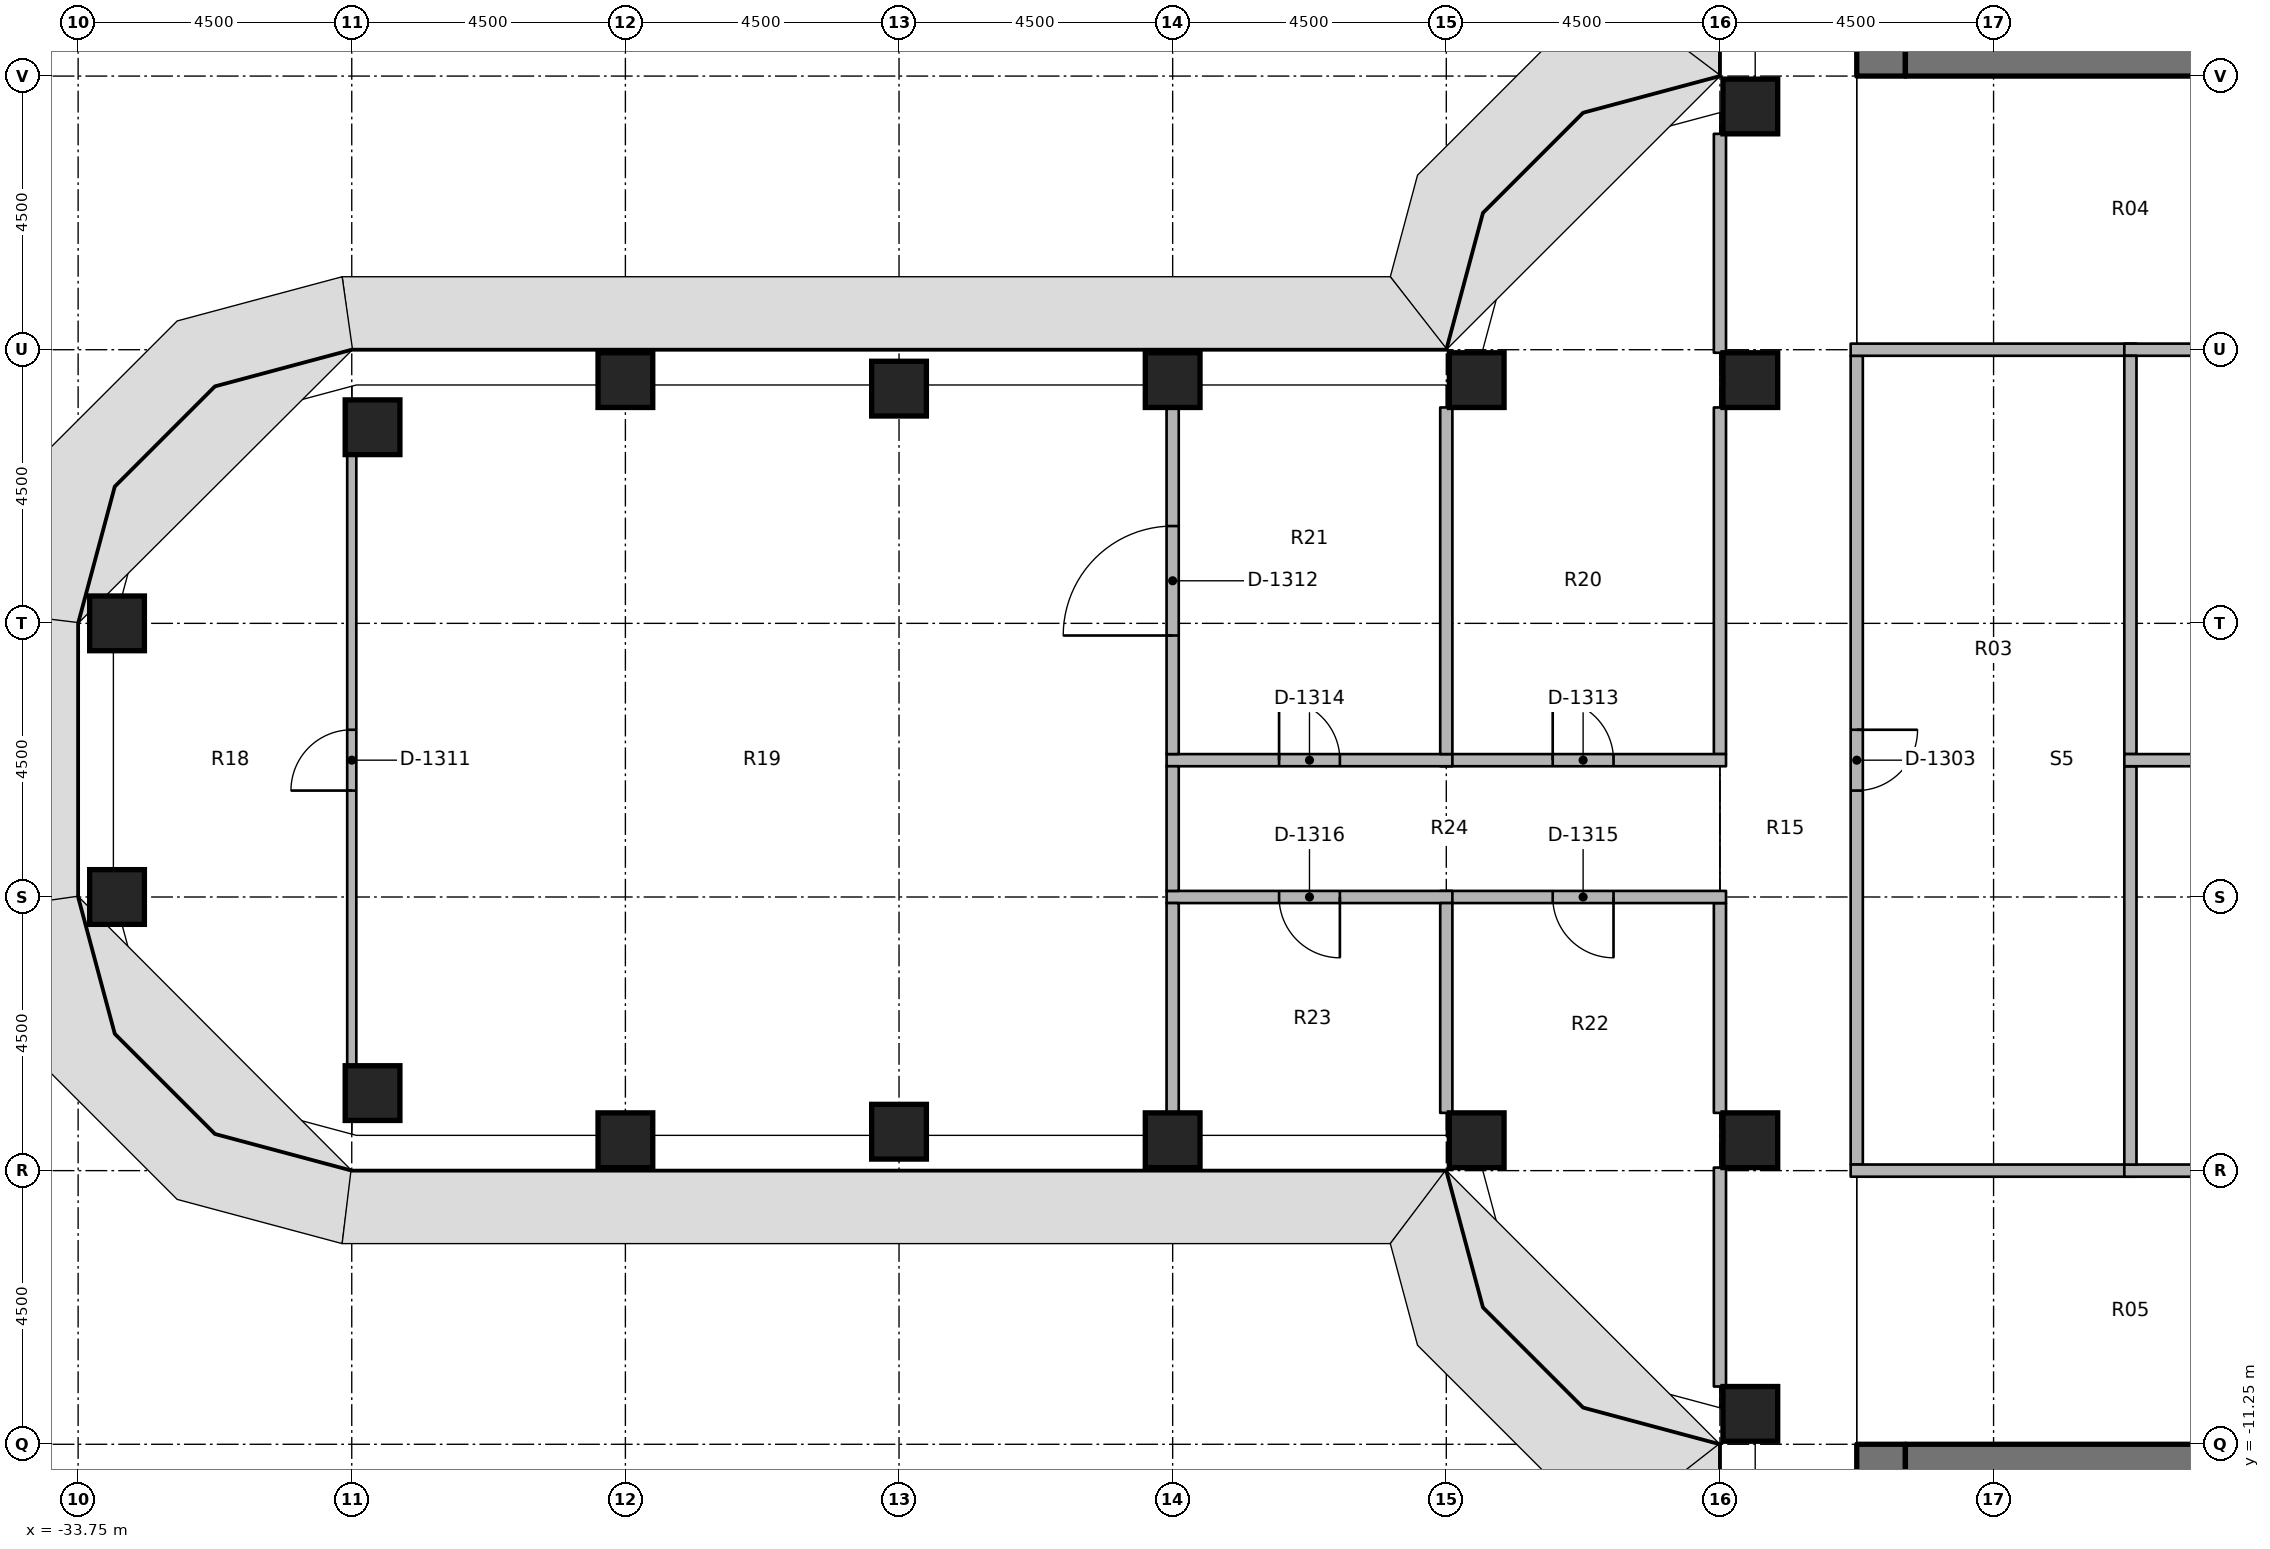
"""IFC4 building model, lengths in metres.
Left out: names, types, materials, properties, quantities, classifications, styles, units other than length and angle.
Written with IfcOpenShell. Run it as: python <this file> out.ifc"""

import sys

from ifc_helpers import new_model, si_unit, direction, frame, frame_2d, origin, origin_2d, place, context, subcontext, project, spatial, rectangle, extrude, element, fill, save


model = new_model("IFC4")
c1 = context("Model", 3, precision=1e-05, world=origin(), true_north=direction((0.0, 1.0)))
c2 = subcontext(c1, "Body", "Model", "MODEL_VIEW")
j1 = project(units=[si_unit("LENGTHUNIT", "METRE"), si_unit("PLANEANGLEUNIT", "RADIAN")], contexts=[c1])
p1 = place(None, origin())
s1 = spatial("IfcSite", under=j1, at=p1, CompositionType="ELEMENT")
p2 = place(p1, origin())
s2 = spatial("IfcBuilding", under=s1, at=p2, CompositionType="ELEMENT")
p3 = place(p2, frame((0.0, 0.0, 132.2)))
s3 = spatial("IfcBuildingStorey", under=s2, at=p3, CompositionType="ELEMENT", Elevation=132.2)
for number, where, z_axis, x_axis in (
    (1, (-33.11, -2.25, 0.0), (0.0, 0.0, 1.0), (1.0, 0.0, 0.0)),
    (2, (-33.11, 2.25, 0.0), (0.0, 0.0, 1.0), (1.0, 0.0, 0.0)),
    (3, (-28.908, -5.475, 0.0), (0.0, 0.0, 1.0), (1.0, 0.0, 0.0)),
    (4, (-28.908, 5.475, 0.0), (0.0, 0.0, 1.0), (1.0, 0.0, 0.0)),
    (5, (-24.75, -6.25, 0.0), (0.0, 0.0, 1.0), (1.0, 0.0, 0.0)),
    (6, (-24.75, 6.25, 0.0), (0.0, 0.0, 1.0), (1.0, 0.0, 0.0)),
    (7, (-20.25, -6.11, 0.0), (0.0, 0.0, 1.0), (1.0, 0.0, 0.0)),
    (8, (-20.25, 6.11, 0.0), (0.0, 0.0, 1.0), (1.0, 0.0, 0.0)),
    (9, (-15.75, -6.25, 0.0), (0.0, 0.0, 1.0), (1.0, 0.0, 0.0)),
    (10, (-15.75, 6.25, 0.0), (0.0, 0.0, 1.0), (1.0, 0.0, 0.0)),
    (11, (-10.75, -6.25, 0.0), (0.0, 0.0, 1.0), (1.0, 0.0, 0.0)),
    (12, (-10.75, 6.25, 0.0), (0.0, 0.0, 1.0), (1.0, 0.0, 0.0)),
    (13, (-6.25, -10.75, 0.0), (0.0, 0.0, 1.0), (1.0, 0.0, 0.0)),
    (14, (-6.25, -6.25, 0.0), (0.0, 0.0, 1.0), (1.0, 0.0, 0.0)),
    (15, (-6.25, 6.25, 0.0), (0.0, 0.0, 1.0), (1.0, 0.0, 0.0)),
    (16, (-6.25, 10.75, 0.0), (0.0, 0.0, 1.0), (1.0, 0.0, 0.0)),
):
    element("IfcColumn", number, at=place(p3, frame(where, z_axis=z_axis, x_axis=x_axis)), inside=s3, PredefinedType="COLUMN", context=c2, shape_type="SweptSolid", body=[
        extrude(rectangle(XDim=0.9, YDim=0.9, at=origin_2d()), origin(), (0.0, 0.0, 1.0), 3.65),
    ])
p4 = place(p3, frame((-4.1, 11.25, 0.0), z_axis=(0.0, 0.0, 1.0), x_axis=(0.0, 1.0, 0.0)))
e17 = element("IfcWall", 17, at=p4, inside=s3, PredefinedType="SHEAR", context=c2, shape_type="SweptSolid", body=[
    extrude(rectangle(XDim=15.0, YDim=0.8, at=frame_2d((7.5, 0.0))), origin(), (0.0, 0.0, 1.0), 3.8),
])
p5 = place(p4, frame((7.15, 0.0, 0.0)))
e18 = element("IfcOpeningElement", 18, at=p5, cuts=e17, PredefinedType="OPENING", context=c2, shape_type="SweptSolid", body=[
    extrude(rectangle(XDim=1.5, YDim=2.3, at=frame_2d((0.75, 1.15))), frame((0.0, 0.41, 0.0), z_axis=(0.0, -1.0, 0.0), x_axis=(1.0, 0.0, 0.0)), (0.0, 0.0, 1.0), 0.82),
])
p6 = place(p4, frame((13.9, 0.0, 0.0)))
e19 = element("IfcOpeningElement", 19, at=p6, cuts=e17, PredefinedType="OPENING", context=c2, shape_type="SweptSolid", body=[
    extrude(rectangle(XDim=0.9, YDim=2.1, at=frame_2d((0.45, 1.05))), frame((0.0, 0.41, 0.0), z_axis=(0.0, -1.0, 0.0), x_axis=(1.0, 0.0, 0.0)), (0.0, 0.0, 1.0), 0.82),
])
p7 = place(p4, frame((1.15, 0.0, 0.0)))
e20 = element("IfcOpeningElement", 20, at=p7, cuts=e17, PredefinedType="OPENING", context=c2, shape_type="SweptSolid", body=[
    extrude(rectangle(XDim=1.2, YDim=2.1, at=frame_2d((0.6, 1.05))), frame((0.0, 0.41, 0.0), z_axis=(0.0, -1.0, 0.0), x_axis=(1.0, 0.0, 0.0)), (0.0, 0.0, 1.0), 0.82),
])
p8 = place(p3, frame((-3.7, 11.65, 0.0), z_axis=(0.0, 0.0, 1.0), x_axis=(1.0, 0.0, 0.0)))
e21 = element("IfcWall", 21, at=p8, inside=s3, PredefinedType="SHEAR", context=c2, shape_type="SweptSolid", body=[
    extrude(rectangle(XDim=7.4, YDim=0.8, at=frame_2d((3.7, 0.0))), origin(), (0.0, 0.0, 1.0), 3.8),
])
p9 = place(p3, frame((-4.1, -11.25, 0.0), z_axis=(0.0, 0.0, 1.0), x_axis=(0.0, -1.0, 0.0)))
e22 = element("IfcWall", 22, at=p9, inside=s3, PredefinedType="SHEAR", context=c2, shape_type="SweptSolid", body=[
    extrude(rectangle(XDim=15.0, YDim=0.8, at=frame_2d((7.5, 0.0))), origin(), (0.0, 0.0, 1.0), 3.8),
])
p10 = place(p9, frame((7.15, 0.0, 0.0)))
e23 = element("IfcOpeningElement", 23, at=p10, cuts=e22, PredefinedType="OPENING", context=c2, shape_type="SweptSolid", body=[
    extrude(rectangle(XDim=1.5, YDim=2.3, at=frame_2d((0.75, 1.15))), frame((0.0, 0.41, 0.0), z_axis=(0.0, -1.0, 0.0), x_axis=(1.0, 0.0, 0.0)), (0.0, 0.0, 1.0), 0.82),
])
p11 = place(p9, frame((5.55, 0.0, 0.0)))
e24 = element("IfcOpeningElement", 24, at=p11, cuts=e22, PredefinedType="OPENING", context=c2, shape_type="SweptSolid", body=[
    extrude(rectangle(XDim=1.2, YDim=2.1, at=frame_2d((0.6, 1.05))), frame((0.0, 0.41, 0.0), z_axis=(0.0, -1.0, 0.0), x_axis=(1.0, 0.0, 0.0)), (0.0, 0.0, 1.0), 0.82),
])
p12 = place(p3, frame((-3.7, -11.65, 0.0), z_axis=(0.0, 0.0, 1.0), x_axis=(1.0, 0.0, 0.0)))
e25 = element("IfcWall", 25, at=p12, inside=s3, PredefinedType="SHEAR", context=c2, shape_type="SweptSolid", body=[
    extrude(rectangle(XDim=7.4, YDim=0.8, at=frame_2d((3.7, 0.0))), origin(), (0.0, 0.0, 1.0), 3.8),
])
p13 = place(p3, frame((-4.5, 6.65, 0.0), z_axis=(0.0, 0.0, 1.0), x_axis=(0.0, -1.0, 0.0)))
e26 = element("IfcWall", 26, at=p13, inside=s3, PredefinedType="PARTITIONING", context=c2, shape_type="SweptSolid", body=[
    extrude(rectangle(XDim=13.3, YDim=0.2, at=frame_2d((6.65, 0.0))), origin(), (0.0, 0.0, 1.0), 2.738),
])
p14 = place(p13, frame((6.15, 0.0, 0.0)))
e27 = element("IfcOpeningElement", 27, at=p14, cuts=e26, PredefinedType="OPENING", context=c2, shape_type="SweptSolid", body=[
    extrude(rectangle(XDim=1.0, YDim=2.1, at=frame_2d((0.5, 1.05))), frame((0.0, 0.11, 0.0), z_axis=(0.0, -1.0, 0.0), x_axis=(1.0, 0.0, 0.0)), (0.0, 0.0, 1.0), 0.22),
])
p15 = place(p3, frame((-6.75, 0.1, 0.0), z_axis=(0.0, 0.0, 1.0), x_axis=(0.0, 1.0, 0.0)))
e28 = element("IfcWall", 28, at=p15, inside=s3, PredefinedType="PARTITIONING", context=c2, shape_type="SweptSolid", body=[
    extrude(rectangle(XDim=5.7, YDim=0.2, at=frame_2d((2.85, 0.0))), origin(), (0.0, 0.0, 1.0), 2.738),
])
for number, where, z_axis, x_axis in (
    (29, (-6.75, 6.7, 0.0), (0.0, 0.0, 1.0), (0.0, 1.0, 0.0)),
    (30, (-6.75, -10.3, 0.0), (0.0, 0.0, 1.0), (0.0, 1.0, 0.0)),
):
    element("IfcWall", number, at=place(p3, frame(where, z_axis=z_axis, x_axis=x_axis)), inside=s3, PredefinedType="PARTITIONING", context=c2, shape_type="SweptSolid", body=[
        extrude(rectangle(XDim=3.6, YDim=0.2, at=frame_2d((1.8, 0.0))), origin(), (0.0, 0.0, 1.0), 2.738),
    ])
p16 = place(p3, frame((-6.75, -5.8, 0.0), z_axis=(0.0, 0.0, 1.0), x_axis=(0.0, 1.0, 0.0)))
e31 = element("IfcWall", 31, at=p16, inside=s3, PredefinedType="PARTITIONING", context=c2, shape_type="SweptSolid", body=[
    extrude(rectangle(XDim=3.45, YDim=0.2, at=frame_2d((1.725, 0.0))), origin(), (0.0, 0.0, 1.0), 2.738),
])
for number, where, z_axis, x_axis in (
    (32, (-4.6, 6.75, 0.0), (0.0, 0.0, 1.0), (1.0, 0.0, 0.0)),
    (33, (-0.1, 6.75, 0.0), (0.0, 0.0, 1.0), (1.0, 0.0, 0.0)),
    (34, (-4.6, -6.75, 0.0), (0.0, 0.0, 1.0), (1.0, 0.0, 0.0)),
    (35, (-0.1, -6.75, 0.0), (0.0, 0.0, 1.0), (1.0, 0.0, 0.0)),
):
    element("IfcWall", number, at=place(p3, frame(where, z_axis=z_axis, x_axis=x_axis)), inside=s3, PredefinedType="PARTITIONING", context=c2, shape_type="SweptSolid", body=[
        extrude(rectangle(XDim=4.7, YDim=0.2, at=frame_2d((2.35, 0.0))), origin(), (0.0, 0.0, 1.0), 2.738),
    ])
for number, where, z_axis, x_axis in (
    (36, (0.0, 0.1, 0.0), (0.0, 0.0, 1.0), (0.0, 1.0, 0.0)),
    (37, (0.0, -6.65, 0.0), (0.0, 0.0, 1.0), (0.0, 1.0, 0.0)),
):
    element("IfcWall", number, at=place(p3, frame(where, z_axis=z_axis, x_axis=x_axis)), inside=s3, PredefinedType="PARTITIONING", context=c2, shape_type="SweptSolid", body=[
        extrude(rectangle(XDim=6.55, YDim=0.2, at=frame_2d((3.275, 0.0))), origin(), (0.0, 0.0, 1.0), 2.738),
    ])
p17 = place(p3, frame((-0.1, 0.0, 0.0), z_axis=(0.0, 0.0, 1.0), x_axis=(1.0, 0.0, 0.0)))
e38 = element("IfcWall", 38, at=p17, inside=s3, PredefinedType="PARTITIONING", context=c2, shape_type="SweptSolid", body=[
    extrude(rectangle(XDim=4.7, YDim=0.2, at=frame_2d((2.35, 0.0))), origin(), (0.0, 0.0, 1.0), 2.738),
])
p18 = place(p3, frame((-11.35, 0.0, 0.0), z_axis=(0.0, 0.0, 1.0), x_axis=(1.0, 0.0, 0.0)))
e39 = element("IfcWall", 39, at=p18, inside=s3, PredefinedType="PARTITIONING", context=c2, shape_type="SweptSolid", body=[
    extrude(rectangle(XDim=4.7, YDim=0.2, at=frame_2d((2.35, 0.0))), origin(), (0.0, 0.0, 1.0), 2.738),
])
p19 = place(p18, frame((1.85, 0.0, 0.0)))
e40 = element("IfcOpeningElement", 40, at=p19, cuts=e39, PredefinedType="OPENING", context=c2, shape_type="SweptSolid", body=[
    extrude(rectangle(XDim=1.0, YDim=2.1, at=frame_2d((0.5, 1.05))), frame((0.0, 0.11, 0.0), z_axis=(0.0, -1.0, 0.0), x_axis=(1.0, 0.0, 0.0)), (0.0, 0.0, 1.0), 0.22),
])
p20 = place(p3, frame((-6.65, -2.25, 0.0), z_axis=(0.0, 0.0, 1.0), x_axis=(-1.0, 0.0, 0.0)))
e41 = element("IfcWall", 41, at=p20, inside=s3, PredefinedType="PARTITIONING", context=c2, shape_type="SweptSolid", body=[
    extrude(rectangle(XDim=4.7, YDim=0.2, at=frame_2d((2.35, 0.0))), origin(), (0.0, 0.0, 1.0), 2.738),
])
p21 = place(p20, frame((1.85, 0.0, 0.0)))
e42 = element("IfcOpeningElement", 42, at=p21, cuts=e41, PredefinedType="OPENING", context=c2, shape_type="SweptSolid", body=[
    extrude(rectangle(XDim=1.0, YDim=2.1, at=frame_2d((0.5, 1.05))), frame((0.0, 0.11, 0.0), z_axis=(0.0, -1.0, 0.0), x_axis=(1.0, 0.0, 0.0)), (0.0, 0.0, 1.0), 0.22),
])
p22 = place(p3, frame((-15.85, 0.0, 0.0), z_axis=(0.0, 0.0, 1.0), x_axis=(1.0, 0.0, 0.0)))
e43 = element("IfcWall", 43, at=p22, inside=s3, PredefinedType="PARTITIONING", context=c2, shape_type="SweptSolid", body=[
    extrude(rectangle(XDim=4.7, YDim=0.2, at=frame_2d((2.35, 0.0))), origin(), (0.0, 0.0, 1.0), 2.738),
])
p23 = place(p22, frame((1.85, 0.0, 0.0)))
e44 = element("IfcOpeningElement", 44, at=p23, cuts=e43, PredefinedType="OPENING", context=c2, shape_type="SweptSolid", body=[
    extrude(rectangle(XDim=1.0, YDim=2.1, at=frame_2d((0.5, 1.05))), frame((0.0, 0.11, 0.0), z_axis=(0.0, -1.0, 0.0), x_axis=(1.0, 0.0, 0.0)), (0.0, 0.0, 1.0), 0.22),
])
p24 = place(p3, frame((-11.15, -2.25, 0.0), z_axis=(0.0, 0.0, 1.0), x_axis=(-1.0, 0.0, 0.0)))
e45 = element("IfcWall", 45, at=p24, inside=s3, PredefinedType="PARTITIONING", context=c2, shape_type="SweptSolid", body=[
    extrude(rectangle(XDim=4.7, YDim=0.2, at=frame_2d((2.35, 0.0))), origin(), (0.0, 0.0, 1.0), 2.738),
])
p25 = place(p24, frame((1.85, 0.0, 0.0)))
e46 = element("IfcOpeningElement", 46, at=p25, cuts=e45, PredefinedType="OPENING", context=c2, shape_type="SweptSolid", body=[
    extrude(rectangle(XDim=1.0, YDim=2.1, at=frame_2d((0.5, 1.05))), frame((0.0, 0.11, 0.0), z_axis=(0.0, -1.0, 0.0), x_axis=(1.0, 0.0, 0.0)), (0.0, 0.0, 1.0), 0.22),
])
p26 = place(p3, frame((-15.75, -2.15, 0.0), z_axis=(0.0, 0.0, 1.0), x_axis=(0.0, 1.0, 0.0)))
e47 = element("IfcWall", 47, at=p26, inside=s3, PredefinedType="PARTITIONING", context=c2, shape_type="SweptSolid", body=[
    extrude(rectangle(XDim=2.05, YDim=0.2, at=frame_2d((1.025, 0.0))), origin(), (0.0, 0.0, 1.0), 2.738),
])
p27 = place(p3, frame((-11.25, 0.1, 0.0), z_axis=(0.0, 0.0, 1.0), x_axis=(0.0, 1.0, 0.0)))
e48 = element("IfcWall", 48, at=p27, inside=s3, PredefinedType="PARTITIONING", context=c2, shape_type="SweptSolid", body=[
    extrude(rectangle(XDim=5.7, YDim=0.2, at=frame_2d((2.85, 0.0))), origin(), (0.0, 0.0, 1.0), 2.738),
])
p28 = place(p3, frame((-11.25, -5.8, 0.0), z_axis=(0.0, 0.0, 1.0), x_axis=(0.0, 1.0, 0.0)))
e49 = element("IfcWall", 49, at=p28, inside=s3, PredefinedType="PARTITIONING", context=c2, shape_type="SweptSolid", body=[
    extrude(rectangle(XDim=3.45, YDim=0.2, at=frame_2d((1.725, 0.0))), origin(), (0.0, 0.0, 1.0), 2.738),
])
p29 = place(p3, frame((-15.75, 0.1, 0.0), z_axis=(0.0, 0.0, 1.0), x_axis=(0.0, 1.0, 0.0)))
e50 = element("IfcWall", 50, at=p29, inside=s3, PredefinedType="PARTITIONING", context=c2, shape_type="SweptSolid", body=[
    extrude(rectangle(XDim=5.7, YDim=0.2, at=frame_2d((2.85, 0.0))), origin(), (0.0, 0.0, 1.0), 2.738),
])
p30 = place(p29, frame((1.95, 0.0, 0.0)))
e51 = element("IfcOpeningElement", 51, at=p30, cuts=e50, PredefinedType="OPENING", context=c2, shape_type="SweptSolid", body=[
    extrude(rectangle(XDim=1.8, YDim=2.1, at=frame_2d((0.9, 1.05))), frame((0.0, 0.11, 0.0), z_axis=(0.0, -1.0, 0.0), x_axis=(1.0, 0.0, 0.0)), (0.0, 0.0, 1.0), 0.22),
])
p31 = place(p3, frame((-15.75, -5.8, 0.0), z_axis=(0.0, 0.0, 1.0), x_axis=(0.0, 1.0, 0.0)))
e52 = element("IfcWall", 52, at=p31, inside=s3, PredefinedType="PARTITIONING", context=c2, shape_type="SweptSolid", body=[
    extrude(rectangle(XDim=3.45, YDim=0.2, at=frame_2d((1.725, 0.0))), origin(), (0.0, 0.0, 1.0), 2.738),
])
p32 = place(p3, frame((-29.25, -5.025, 0.0), z_axis=(0.0, 0.0, 1.0), x_axis=(0.0, 1.0, 0.0)))
e53 = element("IfcWall", 53, at=p32, inside=s3, PredefinedType="PARTITIONING", context=c2, shape_type="SweptSolid", body=[
    extrude(rectangle(XDim=10.05, YDim=0.15, at=frame_2d((5.025, 0.0))), origin(), (0.0, 0.0, 1.0), 2.738),
])
p33 = place(p32, frame((4.525, 0.0, 0.0)))
e54 = element("IfcOpeningElement", 54, at=p33, cuts=e53, PredefinedType="OPENING", context=c2, shape_type="SweptSolid", body=[
    extrude(rectangle(XDim=1.0, YDim=2.1, at=frame_2d((0.5, 1.05))), frame((0.0, 0.085, 0.0), z_axis=(0.0, -1.0, 0.0), x_axis=(1.0, 0.0, 0.0)), (0.0, 0.0, 1.0), 0.17),
])
p34 = place(p14, origin())
e55 = element("IfcDoor", 55, at=p34, inside=s3, OperationType="SINGLE_SWING_RIGHT", PredefinedType="DOOR", context=c2, shape_type="SweptSolid", body=[
    extrude(rectangle(XDim=1.0, YDim=2.1, at=frame_2d((0.5, 1.05))), frame((0.0, 0.025, 0.0), z_axis=(0.0, -1.0, 0.0), x_axis=(1.0, 0.0, 0.0)), (0.0, 0.0, 1.0), 0.05),
])
fill(e27, e55)
p35 = place(p33, origin())
e56 = element("IfcDoor", 56, at=p35, inside=s3, OperationType="SINGLE_SWING_RIGHT", PredefinedType="DOOR", context=c2, shape_type="SweptSolid", body=[
    extrude(rectangle(XDim=1.0, YDim=2.1, at=frame_2d((0.5, 1.05))), frame((0.0, 0.025, 0.0), z_axis=(0.0, -1.0, 0.0), x_axis=(1.0, 0.0, 0.0)), (0.0, 0.0, 1.0), 0.05),
])
fill(e54, e56)
p36 = place(p30, origin())
e57 = element("IfcDoor", 57, at=p36, inside=s3, OperationType="DOUBLE_DOOR_SINGLE_SWING", PredefinedType="DOOR", context=c2, shape_type="SweptSolid", body=[
    extrude(rectangle(XDim=1.8, YDim=2.1, at=frame_2d((0.9, 1.05))), frame((0.0, 0.025, 0.0), z_axis=(0.0, -1.0, 0.0), x_axis=(1.0, 0.0, 0.0)), (0.0, 0.0, 1.0), 0.05),
])
fill(e51, e57)
p37 = place(p19, origin())
e58 = element("IfcDoor", 58, at=p37, inside=s3, OperationType="SINGLE_SWING_RIGHT", PredefinedType="DOOR", context=c2, shape_type="SweptSolid", body=[
    extrude(rectangle(XDim=1.0, YDim=2.1, at=frame_2d((0.5, 1.05))), frame((0.0, 0.025, 0.0), z_axis=(0.0, -1.0, 0.0), x_axis=(1.0, 0.0, 0.0)), (0.0, 0.0, 1.0), 0.05),
])
fill(e40, e58)
p38 = place(p23, origin())
e59 = element("IfcDoor", 59, at=p38, inside=s3, OperationType="SINGLE_SWING_RIGHT", PredefinedType="DOOR", context=c2, shape_type="SweptSolid", body=[
    extrude(rectangle(XDim=1.0, YDim=2.1, at=frame_2d((0.5, 1.05))), frame((0.0, 0.025, 0.0), z_axis=(0.0, -1.0, 0.0), x_axis=(1.0, 0.0, 0.0)), (0.0, 0.0, 1.0), 0.05),
])
fill(e44, e59)
p39 = place(p21, origin())
e60 = element("IfcDoor", 60, at=p39, inside=s3, OperationType="SINGLE_SWING_RIGHT", PredefinedType="DOOR", context=c2, shape_type="SweptSolid", body=[
    extrude(rectangle(XDim=1.0, YDim=2.1, at=frame_2d((0.5, 1.05))), frame((0.0, 0.025, 0.0), z_axis=(0.0, -1.0, 0.0), x_axis=(1.0, 0.0, 0.0)), (0.0, 0.0, 1.0), 0.05),
])
fill(e42, e60)
p40 = place(p25, origin())
e61 = element("IfcDoor", 61, at=p40, inside=s3, OperationType="SINGLE_SWING_RIGHT", PredefinedType="DOOR", context=c2, shape_type="SweptSolid", body=[
    extrude(rectangle(XDim=1.0, YDim=2.1, at=frame_2d((0.5, 1.05))), frame((0.0, 0.025, 0.0), z_axis=(0.0, -1.0, 0.0), x_axis=(1.0, 0.0, 0.0)), (0.0, 0.0, 1.0), 0.05),
])
fill(e46, e61)
save(model, sys.argv[1])
